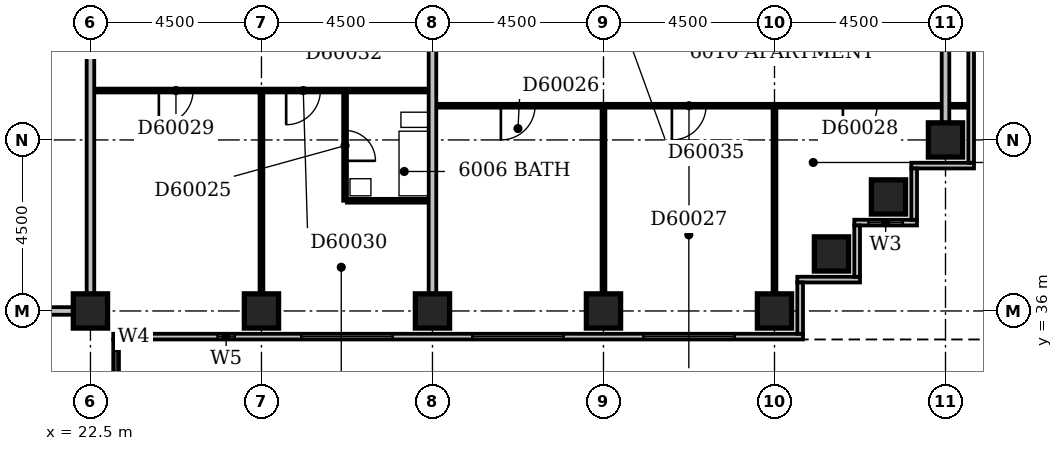
"""IFC4 building model, lengths in metres.
Left out: names, types, materials, properties, quantities, classifications, styles, units other than length and angle.
Written with IfcOpenShell. Run it as: python <this file> out.ifc"""

import sys

from ifc_helpers import new_model, si_unit, direction, frame, frame_2d, origin, origin_2d, place, context, subcontext, project, spatial, rectangle, extrude, element, fill, save


model = new_model("IFC4")
c1 = context("Model", 3, precision=1e-05, world=origin(), true_north=direction((0.0, 1.0)))
c2 = subcontext(c1, "Body", "Model", "MODEL_VIEW")
j1 = project(units=[si_unit("LENGTHUNIT", "METRE"), si_unit("PLANEANGLEUNIT", "RADIAN")], contexts=[c1])
p1 = place(None, origin())
s1 = spatial("IfcSite", under=j1, at=p1, CompositionType="ELEMENT")
p2 = place(p1, origin())
s2 = spatial("IfcBuilding", under=s1, at=p2, CompositionType="ELEMENT")
p3 = place(p2, frame((0.0, 0.0, 233.0)))
s3 = spatial("IfcBuildingStorey", under=s2, at=p3, CompositionType="ELEMENT", Elevation=233.0)
for number, where, z_axis, x_axis in (
    (1, (22.5, 36.0, -0.35), (0.0, 0.0, 1.0), (1.0, 0.0, 0.0)),
    (2, (27.0, 36.0, -0.35), (0.0, 0.0, 1.0), (1.0, 0.0, 0.0)),
    (3, (31.5, 36.0, -0.35), (0.0, 0.0, 1.0), (1.0, 0.0, 0.0)),
    (4, (36.0, 36.0, -0.35), (0.0, 0.0, 1.0), (1.0, 0.0, 0.0)),
    (5, (40.5, 36.0, -0.35), (0.0, 0.0, 1.0), (1.0, 0.0, 0.0)),
    (6, (42.0, 37.5, -0.35), (0.0, 0.0, 1.0), (1.0, 0.0, 0.0)),
    (7, (43.5, 39.0, -0.35), (0.0, 0.0, 1.0), (1.0, 0.0, 0.0)),
    (8, (45.0, 40.5, -0.35), (0.0, 0.0, 1.0), (1.0, 0.0, 0.0)),
):
    element("IfcColumn", number, at=place(p3, frame(where, z_axis=z_axis, x_axis=x_axis)), inside=s3, PredefinedType="COLUMN", context=c2, shape_type="SweptSolid", body=[
        extrude(rectangle(XDim=0.9, YDim=0.9, at=origin_2d()), origin(), (0.0, 0.0, 1.0), 3.65),
    ])
p4 = place(p3, frame((23.175, 17.4, 0.0), z_axis=(0.0, 0.0, 1.0), x_axis=(0.0, 1.0, 0.0)))
e9 = element("IfcWall", 9, at=p4, inside=s3, PredefinedType="STANDARD", context=c2, shape_type="SweptSolid", body=[
    extrude(rectangle(XDim=17.85, YDim=0.15, at=frame_2d((8.925, 0.0))), origin(), (0.0, 0.0, 1.0), 2.7),
])
p5 = place(p4, frame((2.941, 0.0, 0.6)))
e10 = element("IfcOpeningElement", 10, at=p5, cuts=e9, PredefinedType="OPENING", context=c2, shape_type="SweptSolid", body=[
    extrude(rectangle(XDim=1.5, YDim=1.8, at=frame_2d((0.75, 0.9))), frame((0.0, 0.087, 0.0), z_axis=(0.0, -1.0, 0.0), x_axis=(1.0, 0.0, 0.0)), (0.0, 0.0, 1.0), 0.174),
])
p6 = place(p4, frame((6.15, 0.0, 0.6)))
e11 = element("IfcOpeningElement", 11, at=p6, cuts=e9, PredefinedType="OPENING", context=c2, shape_type="SweptSolid", body=[
    extrude(rectangle(XDim=2.4, YDim=1.8, at=frame_2d((1.2, 0.9))), frame((0.0, 0.087, 0.0), z_axis=(0.0, -1.0, 0.0), x_axis=(1.0, 0.0, 0.0)), (0.0, 0.0, 1.0), 0.174),
])
p7 = place(p4, frame((10.65, 0.0, 0.6)))
e12 = element("IfcOpeningElement", 12, at=p7, cuts=e9, PredefinedType="OPENING", context=c2, shape_type="SweptSolid", body=[
    extrude(rectangle(XDim=2.4, YDim=1.8, at=frame_2d((1.2, 0.9))), frame((0.0, 0.087, 0.0), z_axis=(0.0, -1.0, 0.0), x_axis=(1.0, 0.0, 0.0)), (0.0, 0.0, 1.0), 0.174),
])
p8 = place(p4, frame((15.15, 0.0, 0.6)))
e13 = element("IfcOpeningElement", 13, at=p8, cuts=e9, PredefinedType="OPENING", context=c2, shape_type="SweptSolid", body=[
    extrude(rectangle(XDim=2.4, YDim=1.8, at=frame_2d((1.2, 0.9))), frame((0.0, 0.087, 0.0), z_axis=(0.0, -1.0, 0.0), x_axis=(1.0, 0.0, 0.0)), (0.0, 0.0, 1.0), 0.174),
])
p9 = place(p3, frame((23.1, 35.325, 0.0), z_axis=(0.0, 0.0, 1.0), x_axis=(1.0, 0.0, 0.0)))
e14 = element("IfcWall", 14, at=p9, inside=s3, PredefinedType="STANDARD", context=c2, shape_type="SweptSolid", body=[
    extrude(rectangle(XDim=18.15, YDim=0.15, at=frame_2d((9.075, 0.0))), origin(), (0.0, 0.0, 1.0), 2.7),
])
p10 = place(p9, frame((0.239, 0.0, 0.6)))
e15 = element("IfcOpeningElement", 15, at=p10, cuts=e14, PredefinedType="OPENING", context=c2, shape_type="SweptSolid", body=[
    extrude(rectangle(XDim=0.6, YDim=1.8, at=frame_2d((0.3, 0.9))), frame((0.0, 0.087, 0.0), z_axis=(0.0, -1.0, 0.0), x_axis=(1.0, 0.0, 0.0)), (0.0, 0.0, 1.0), 0.174),
])
p11 = place(p9, frame((2.745, 0.0, 0.6)))
e16 = element("IfcOpeningElement", 16, at=p11, cuts=e14, PredefinedType="OPENING", context=c2, shape_type="SweptSolid", body=[
    extrude(rectangle(XDim=0.45, YDim=1.8, at=frame_2d((0.225, 0.9))), frame((0.0, 0.087, 0.0), z_axis=(0.0, -1.0, 0.0), x_axis=(1.0, 0.0, 0.0)), (0.0, 0.0, 1.0), 0.174),
])
p12 = place(p9, frame((4.95, 0.0, 0.6)))
e17 = element("IfcOpeningElement", 17, at=p12, cuts=e14, PredefinedType="OPENING", context=c2, shape_type="SweptSolid", body=[
    extrude(rectangle(XDim=2.4, YDim=1.8, at=frame_2d((1.2, 0.9))), frame((0.0, 0.087, 0.0), z_axis=(0.0, -1.0, 0.0), x_axis=(1.0, 0.0, 0.0)), (0.0, 0.0, 1.0), 0.174),
])
p13 = place(p9, frame((9.45, 0.0, 0.6)))
e18 = element("IfcOpeningElement", 18, at=p13, cuts=e14, PredefinedType="OPENING", context=c2, shape_type="SweptSolid", body=[
    extrude(rectangle(XDim=2.4, YDim=1.8, at=frame_2d((1.2, 0.9))), frame((0.0, 0.087, 0.0), z_axis=(0.0, -1.0, 0.0), x_axis=(1.0, 0.0, 0.0)), (0.0, 0.0, 1.0), 0.174),
])
p14 = place(p9, frame((13.95, 0.0, 0.6)))
e19 = element("IfcOpeningElement", 19, at=p14, cuts=e14, PredefinedType="OPENING", context=c2, shape_type="SweptSolid", body=[
    extrude(rectangle(XDim=2.4, YDim=1.8, at=frame_2d((1.2, 0.9))), frame((0.0, 0.087, 0.0), z_axis=(0.0, -1.0, 0.0), x_axis=(1.0, 0.0, 0.0)), (0.0, 0.0, 1.0), 0.174),
])
p15 = place(p3, frame((41.175, 35.4, 0.0), z_axis=(0.0, 0.0, 1.0), x_axis=(0.0, 1.0, 0.0)))
e20 = element("IfcWall", 20, at=p15, inside=s3, PredefinedType="STANDARD", context=c2, shape_type="SweptSolid", body=[
    extrude(rectangle(XDim=1.35, YDim=0.15, at=frame_2d((0.675, 0.0))), origin(), (0.0, 0.0, 1.0), 2.7),
])
p16 = place(p3, frame((41.1, 36.825, 0.0), z_axis=(0.0, 0.0, 1.0), x_axis=(1.0, 0.0, 0.0)))
e21 = element("IfcWall", 21, at=p16, inside=s3, PredefinedType="STANDARD", context=c2, shape_type="SweptSolid", body=[
    extrude(rectangle(XDim=1.65, YDim=0.15, at=frame_2d((0.825, 0.0))), origin(), (0.0, 0.0, 1.0), 2.7),
])
p17 = place(p3, frame((42.675, 36.9, 0.0), z_axis=(0.0, 0.0, 1.0), x_axis=(0.0, 1.0, 0.0)))
e22 = element("IfcWall", 22, at=p17, inside=s3, PredefinedType="STANDARD", context=c2, shape_type="SweptSolid", body=[
    extrude(rectangle(XDim=1.35, YDim=0.15, at=frame_2d((0.675, 0.0))), origin(), (0.0, 0.0, 1.0), 2.7),
])
p18 = place(p3, frame((42.6, 38.325, 0.0), z_axis=(0.0, 0.0, 1.0), x_axis=(1.0, 0.0, 0.0)))
e23 = element("IfcWall", 23, at=p18, inside=s3, PredefinedType="STANDARD", context=c2, shape_type="SweptSolid", body=[
    extrude(rectangle(XDim=1.65, YDim=0.15, at=frame_2d((0.825, 0.0))), origin(), (0.0, 0.0, 1.0), 2.7),
])
p19 = place(p18, frame((0.375, 0.0, 0.5)))
e24 = element("IfcOpeningElement", 24, at=p19, cuts=e23, PredefinedType="OPENING", context=c2, shape_type="SweptSolid", body=[
    extrude(rectangle(XDim=0.9, YDim=1.8, at=frame_2d((0.45, 0.9))), frame((0.0, 0.087, 0.0), z_axis=(0.0, -1.0, 0.0), x_axis=(1.0, 0.0, 0.0)), (0.0, 0.0, 1.0), 0.174),
])
p20 = place(p3, frame((44.175, 38.4, 0.0), z_axis=(0.0, 0.0, 1.0), x_axis=(0.0, 1.0, 0.0)))
e25 = element("IfcWall", 25, at=p20, inside=s3, PredefinedType="STANDARD", context=c2, shape_type="SweptSolid", body=[
    extrude(rectangle(XDim=1.35, YDim=0.15, at=frame_2d((0.675, 0.0))), origin(), (0.0, 0.0, 1.0), 2.7),
])
p21 = place(p3, frame((44.1, 39.825, 0.0), z_axis=(0.0, 0.0, 1.0), x_axis=(1.0, 0.0, 0.0)))
e26 = element("IfcWall", 26, at=p21, inside=s3, PredefinedType="STANDARD", context=c2, shape_type="SweptSolid", body=[
    extrude(rectangle(XDim=1.65, YDim=0.15, at=frame_2d((0.825, 0.0))), origin(), (0.0, 0.0, 1.0), 2.7),
])
p22 = place(p3, frame((45.675, 39.9, 0.0), z_axis=(0.0, 0.0, 1.0), x_axis=(0.0, 1.0, 0.0)))
e27 = element("IfcWall", 27, at=p22, inside=s3, PredefinedType="STANDARD", context=c2, shape_type="SweptSolid", body=[
    extrude(rectangle(XDim=19.35, YDim=0.15, at=frame_2d((9.675, 0.0))), origin(), (0.0, 0.0, 1.0), 2.7),
])
p23 = place(p22, frame((6.75, 0.0, 0.0)))
e28 = element("IfcOpeningElement", 28, at=p23, cuts=e27, PredefinedType="OPENING", context=c2, shape_type="SweptSolid", body=[
    extrude(rectangle(XDim=1.2, YDim=2.4, at=frame_2d((0.6, 1.2))), frame((0.0, 0.087, 0.0), z_axis=(0.0, -1.0, 0.0), x_axis=(1.0, 0.0, 0.0)), (0.0, 0.0, 1.0), 0.174),
])
p24 = place(p3, frame((9.1, 36.0, 0.0), z_axis=(0.0, 0.0, 1.0), x_axis=(1.0, 0.0, 0.0)))
e29 = element("IfcWall", 29, at=p24, inside=s3, PredefinedType="PARTITIONING", context=c2, shape_type="SweptSolid", body=[
    extrude(rectangle(XDim=12.95, YDim=0.2, at=frame_2d((6.475, 0.0))), origin(), (0.0, 0.0, 1.0), 3.3),
])
p25 = place(p3, frame((22.5, 36.45, 0.0), z_axis=(0.0, 0.0, 1.0), x_axis=(0.0, 1.0, 0.0)))
e30 = element("IfcWall", 30, at=p25, inside=s3, PredefinedType="PARTITIONING", context=c2, shape_type="SweptSolid", body=[
    extrude(rectangle(XDim=13.05, YDim=0.2, at=frame_2d((6.525, 0.0))), origin(), (0.0, 0.0, 1.0), 3.3),
])
p26 = place(p3, frame((27.0, 36.45, 0.0), z_axis=(0.0, 0.0, 1.0), x_axis=(0.0, 1.0, 0.0)))
e31 = element("IfcWall", 31, at=p26, inside=s3, PredefinedType="PARTITIONING", context=c2, shape_type="SweptSolid", body=[
    extrude(rectangle(XDim=5.3, YDim=0.1, at=frame_2d((2.65, 0.0))), origin(), (0.0, 0.0, 1.0), 2.4),
])
p27 = place(p3, frame((31.5, 36.45, 0.0), z_axis=(0.0, 0.0, 1.0), x_axis=(0.0, 1.0, 0.0)))
e32 = element("IfcWall", 32, at=p27, inside=s3, PredefinedType="PARTITIONING", context=c2, shape_type="SweptSolid", body=[
    extrude(rectangle(XDim=12.95, YDim=0.2, at=frame_2d((6.475, 0.0))), origin(), (0.0, 0.0, 1.0), 3.3),
])
p28 = place(p3, frame((36.0, 36.45, 0.0), z_axis=(0.0, 0.0, 1.0), x_axis=(0.0, 1.0, 0.0)))
e33 = element("IfcWall", 33, at=p28, inside=s3, PredefinedType="PARTITIONING", context=c2, shape_type="SweptSolid", body=[
    extrude(rectangle(XDim=4.9, YDim=0.1, at=frame_2d((2.45, 0.0))), origin(), (0.0, 0.0, 1.0), 2.4),
])
p29 = place(p3, frame((40.5, 36.45, 0.0), z_axis=(0.0, 0.0, 1.0), x_axis=(0.0, 1.0, 0.0)))
e34 = element("IfcWall", 34, at=p29, inside=s3, PredefinedType="PARTITIONING", context=c2, shape_type="SweptSolid", body=[
    extrude(rectangle(XDim=4.9, YDim=0.1, at=frame_2d((2.45, 0.0))), origin(), (0.0, 0.0, 1.0), 3.3),
])
p30 = place(p3, frame((29.2, 38.9, 0.0), z_axis=(0.0, 0.0, 1.0), x_axis=(0.0, 1.0, 0.0)))
e35 = element("IfcWall", 35, at=p30, inside=s3, PredefinedType="PLUMBINGWALL", context=c2, shape_type="SweptSolid", body=[
    extrude(rectangle(XDim=2.85, YDim=0.1, at=frame_2d((1.425, 0.0))), origin(), (0.0, 0.0, 1.0), 3.3),
])
p31 = place(p30, frame((1.05, 0.0, 0.0)))
e36 = element("IfcOpeningElement", 36, at=p31, cuts=e35, PredefinedType="OPENING", context=c2, shape_type="SweptSolid", body=[
    extrude(rectangle(XDim=0.8, YDim=2.1, at=frame_2d((0.4, 1.05))), frame((0.0, 0.062, 0.0), z_axis=(0.0, -1.0, 0.0), x_axis=(1.0, 0.0, 0.0)), (0.0, 0.0, 1.0), 0.124),
])
p32 = place(p3, frame((29.25, 38.9, 0.0), z_axis=(0.0, 0.0, 1.0), x_axis=(1.0, 0.0, 0.0)))
e37 = element("IfcWall", 37, at=p32, inside=s3, PredefinedType="PLUMBINGWALL", context=c2, shape_type="SweptSolid", body=[
    extrude(rectangle(XDim=2.15, YDim=0.1, at=frame_2d((1.075, 0.0))), origin(), (0.0, 0.0, 1.0), 3.3),
])
p33 = place(p3, frame((45.0, 40.95, 0.0), z_axis=(0.0, 0.0, 1.0), x_axis=(0.0, 1.0, 0.0)))
e38 = element("IfcWall", 38, at=p33, inside=s3, PredefinedType="PARTITIONING", context=c2, shape_type="SweptSolid", body=[
    extrude(rectangle(XDim=8.1, YDim=0.2, at=frame_2d((4.05, 0.0))), origin(), (0.0, 0.0, 1.0), 2.7),
])
p34 = place(p3, frame((31.6, 41.4, 0.0), z_axis=(0.0, 0.0, 1.0), x_axis=(1.0, 0.0, 0.0)))
e39 = element("IfcWall", 39, at=p34, inside=s3, PredefinedType="PARTITIONING", context=c2, shape_type="SweptSolid", body=[
    extrude(rectangle(XDim=14.0, YDim=0.1, at=frame_2d((7.0, 0.0))), origin(), (0.0, 0.0, 1.0), 3.3),
])
p35 = place(p34, frame((1.7, 0.0, 0.0)))
e40 = element("IfcOpeningElement", 40, at=p35, cuts=e39, PredefinedType="OPENING", context=c2, shape_type="SweptSolid", body=[
    extrude(rectangle(XDim=0.9, YDim=2.1, at=frame_2d((0.45, 1.05))), frame((0.0, 0.062, 0.0), z_axis=(0.0, -1.0, 0.0), x_axis=(1.0, 0.0, 0.0)), (0.0, 0.0, 1.0), 0.124),
])
p36 = place(p34, frame((6.2, 0.0, 0.0)))
e41 = element("IfcOpeningElement", 41, at=p36, cuts=e39, PredefinedType="OPENING", context=c2, shape_type="SweptSolid", body=[
    extrude(rectangle(XDim=0.9, YDim=2.1, at=frame_2d((0.45, 1.05))), frame((0.0, 0.062, 0.0), z_axis=(0.0, -1.0, 0.0), x_axis=(1.0, 0.0, 0.0)), (0.0, 0.0, 1.0), 0.124),
])
p37 = place(p34, frame((10.7, 0.0, 0.0)))
e42 = element("IfcOpeningElement", 42, at=p37, cuts=e39, PredefinedType="OPENING", context=c2, shape_type="SweptSolid", body=[
    extrude(rectangle(XDim=0.9, YDim=2.1, at=frame_2d((0.45, 1.05))), frame((0.0, 0.062, 0.0), z_axis=(0.0, -1.0, 0.0), x_axis=(1.0, 0.0, 0.0)), (0.0, 0.0, 1.0), 0.124),
])
p38 = place(p3, frame((22.6, 41.8, 0.0), z_axis=(0.0, 0.0, 1.0), x_axis=(1.0, 0.0, 0.0)))
e43 = element("IfcWall", 43, at=p38, inside=s3, PredefinedType="PARTITIONING", context=c2, shape_type="SweptSolid", body=[
    extrude(rectangle(XDim=8.8, YDim=0.1, at=frame_2d((4.4, 0.0))), origin(), (0.0, 0.0, 1.0), 3.3),
])
p39 = place(p38, frame((1.7, 0.0, 0.0)))
e44 = element("IfcOpeningElement", 44, at=p39, cuts=e43, PredefinedType="OPENING", context=c2, shape_type="SweptSolid", body=[
    extrude(rectangle(XDim=0.9, YDim=2.1, at=frame_2d((0.45, 1.05))), frame((0.0, 0.062, 0.0), z_axis=(0.0, -1.0, 0.0), x_axis=(1.0, 0.0, 0.0)), (0.0, 0.0, 1.0), 0.124),
])
p40 = place(p38, frame((5.05, 0.0, 0.0)))
e45 = element("IfcOpeningElement", 45, at=p40, cuts=e43, PredefinedType="OPENING", context=c2, shape_type="SweptSolid", body=[
    extrude(rectangle(XDim=0.9, YDim=2.1, at=frame_2d((0.45, 1.05))), frame((0.0, 0.062, 0.0), z_axis=(0.0, -1.0, 0.0), x_axis=(1.0, 0.0, 0.0)), (0.0, 0.0, 1.0), 0.124),
])
p41 = place(p8, origin())
e46 = element("IfcWindow", 46, at=p41, inside=s3, PartitioningType="SINGLE_PANEL", PredefinedType="WINDOW", context=c2, shape_type="SweptSolid", body=[
    extrude(rectangle(XDim=2.4, YDim=1.8, at=frame_2d((1.2, 0.9))), frame((0.0, 0.03, 0.0), z_axis=(0.0, -1.0, 0.0), x_axis=(1.0, 0.0, 0.0)), (0.0, 0.0, 1.0), 0.06),
])
fill(e13, e46)
p42 = place(p10, origin())
e47 = element("IfcWindow", 47, at=p42, inside=s3, PartitioningType="SINGLE_PANEL", PredefinedType="WINDOW", context=c2, shape_type="SweptSolid", body=[
    extrude(rectangle(XDim=0.6, YDim=1.8, at=frame_2d((0.3, 0.9))), frame((0.0, 0.03, 0.0), z_axis=(0.0, -1.0, 0.0), x_axis=(1.0, 0.0, 0.0)), (0.0, 0.0, 1.0), 0.06),
])
fill(e15, e47)
p43 = place(p11, origin())
e48 = element("IfcWindow", 48, at=p43, inside=s3, PartitioningType="SINGLE_PANEL", PredefinedType="WINDOW", context=c2, shape_type="SweptSolid", body=[
    extrude(rectangle(XDim=0.45, YDim=1.8, at=frame_2d((0.225, 0.9))), frame((0.0, 0.03, 0.0), z_axis=(0.0, -1.0, 0.0), x_axis=(1.0, 0.0, 0.0)), (0.0, 0.0, 1.0), 0.06),
])
fill(e16, e48)
p44 = place(p12, origin())
e49 = element("IfcWindow", 49, at=p44, inside=s3, PartitioningType="SINGLE_PANEL", PredefinedType="WINDOW", context=c2, shape_type="SweptSolid", body=[
    extrude(rectangle(XDim=2.4, YDim=1.8, at=frame_2d((1.2, 0.9))), frame((0.0, 0.03, 0.0), z_axis=(0.0, -1.0, 0.0), x_axis=(1.0, 0.0, 0.0)), (0.0, 0.0, 1.0), 0.06),
])
fill(e17, e49)
p45 = place(p13, origin())
e50 = element("IfcWindow", 50, at=p45, inside=s3, PartitioningType="SINGLE_PANEL", PredefinedType="WINDOW", context=c2, shape_type="SweptSolid", body=[
    extrude(rectangle(XDim=2.4, YDim=1.8, at=frame_2d((1.2, 0.9))), frame((0.0, 0.03, 0.0), z_axis=(0.0, -1.0, 0.0), x_axis=(1.0, 0.0, 0.0)), (0.0, 0.0, 1.0), 0.06),
])
fill(e18, e50)
p46 = place(p14, origin())
e51 = element("IfcWindow", 51, at=p46, inside=s3, PartitioningType="SINGLE_PANEL", PredefinedType="WINDOW", context=c2, shape_type="SweptSolid", body=[
    extrude(rectangle(XDim=2.4, YDim=1.8, at=frame_2d((1.2, 0.9))), frame((0.0, 0.03, 0.0), z_axis=(0.0, -1.0, 0.0), x_axis=(1.0, 0.0, 0.0)), (0.0, 0.0, 1.0), 0.06),
])
fill(e19, e51)
p47 = place(p19, origin())
e52 = element("IfcWindow", 52, at=p47, inside=s3, PartitioningType="SINGLE_PANEL", PredefinedType="WINDOW", context=c2, shape_type="SweptSolid", body=[
    extrude(rectangle(XDim=0.9, YDim=1.8, at=frame_2d((0.45, 0.9))), frame((0.0, 0.03, 0.0), z_axis=(0.0, -1.0, 0.0), x_axis=(1.0, 0.0, 0.0)), (0.0, 0.0, 1.0), 0.06),
])
fill(e24, e52)
p48 = place(p31, frame((0.8, 0.0, 0.0), z_axis=(0.0, 0.0, 1.0), x_axis=(-1.0, 0.0, 0.0)))
e53 = element("IfcDoor", 53, at=p48, inside=s3, OperationType="SINGLE_SWING_RIGHT", PredefinedType="DOOR", context=c2, shape_type="SweptSolid", body=[
    extrude(rectangle(XDim=0.8, YDim=2.1, at=frame_2d((0.4, 1.05))), frame((0.0, 0.025, 0.0), z_axis=(0.0, -1.0, 0.0), x_axis=(1.0, 0.0, 0.0)), (0.0, 0.0, 1.0), 0.05),
])
fill(e36, e53)
p49 = place(p35, frame((0.9, 0.0, 0.0), z_axis=(0.0, 0.0, 1.0), x_axis=(-1.0, 0.0, 0.0)))
e54 = element("IfcDoor", 54, at=p49, inside=s3, OperationType="SINGLE_SWING_RIGHT", PredefinedType="DOOR", context=c2, shape_type="SweptSolid", body=[
    extrude(rectangle(XDim=0.9, YDim=2.1, at=frame_2d((0.45, 1.05))), frame((0.0, 0.025, 0.0), z_axis=(0.0, -1.0, 0.0), x_axis=(1.0, 0.0, 0.0)), (0.0, 0.0, 1.0), 0.05),
])
fill(e40, e54)
p50 = place(p36, frame((0.9, 0.0, 0.0), z_axis=(0.0, 0.0, 1.0), x_axis=(-1.0, 0.0, 0.0)))
e55 = element("IfcDoor", 55, at=p50, inside=s3, OperationType="SINGLE_SWING_RIGHT", PredefinedType="DOOR", context=c2, shape_type="SweptSolid", body=[
    extrude(rectangle(XDim=0.9, YDim=2.1, at=frame_2d((0.45, 1.05))), frame((0.0, 0.025, 0.0), z_axis=(0.0, -1.0, 0.0), x_axis=(1.0, 0.0, 0.0)), (0.0, 0.0, 1.0), 0.05),
])
fill(e41, e55)
p51 = place(p37, frame((0.9, 0.0, 0.0), z_axis=(0.0, 0.0, 1.0), x_axis=(-1.0, 0.0, 0.0)))
e56 = element("IfcDoor", 56, at=p51, inside=s3, OperationType="SINGLE_SWING_RIGHT", PredefinedType="DOOR", context=c2, shape_type="SweptSolid", body=[
    extrude(rectangle(XDim=0.9, YDim=2.1, at=frame_2d((0.45, 1.05))), frame((0.0, 0.025, 0.0), z_axis=(0.0, -1.0, 0.0), x_axis=(1.0, 0.0, 0.0)), (0.0, 0.0, 1.0), 0.05),
])
fill(e42, e56)
p52 = place(p39, frame((0.9, 0.0, 0.0), z_axis=(0.0, 0.0, 1.0), x_axis=(-1.0, 0.0, 0.0)))
e57 = element("IfcDoor", 57, at=p52, inside=s3, OperationType="SINGLE_SWING_RIGHT", PredefinedType="DOOR", context=c2, shape_type="SweptSolid", body=[
    extrude(rectangle(XDim=0.9, YDim=2.1, at=frame_2d((0.45, 1.05))), frame((0.0, 0.025, 0.0), z_axis=(0.0, -1.0, 0.0), x_axis=(1.0, 0.0, 0.0)), (0.0, 0.0, 1.0), 0.05),
])
fill(e44, e57)
p53 = place(p40, frame((0.9, 0.0, 0.0), z_axis=(0.0, 0.0, 1.0), x_axis=(-1.0, 0.0, 0.0)))
e58 = element("IfcDoor", 58, at=p53, inside=s3, OperationType="SINGLE_SWING_RIGHT", PredefinedType="DOOR", context=c2, shape_type="SweptSolid", body=[
    extrude(rectangle(XDim=0.9, YDim=2.1, at=frame_2d((0.45, 1.05))), frame((0.0, 0.025, 0.0), z_axis=(0.0, -1.0, 0.0), x_axis=(1.0, 0.0, 0.0)), (0.0, 0.0, 1.0), 0.05),
])
fill(e45, e58)
save(model, sys.argv[1])
